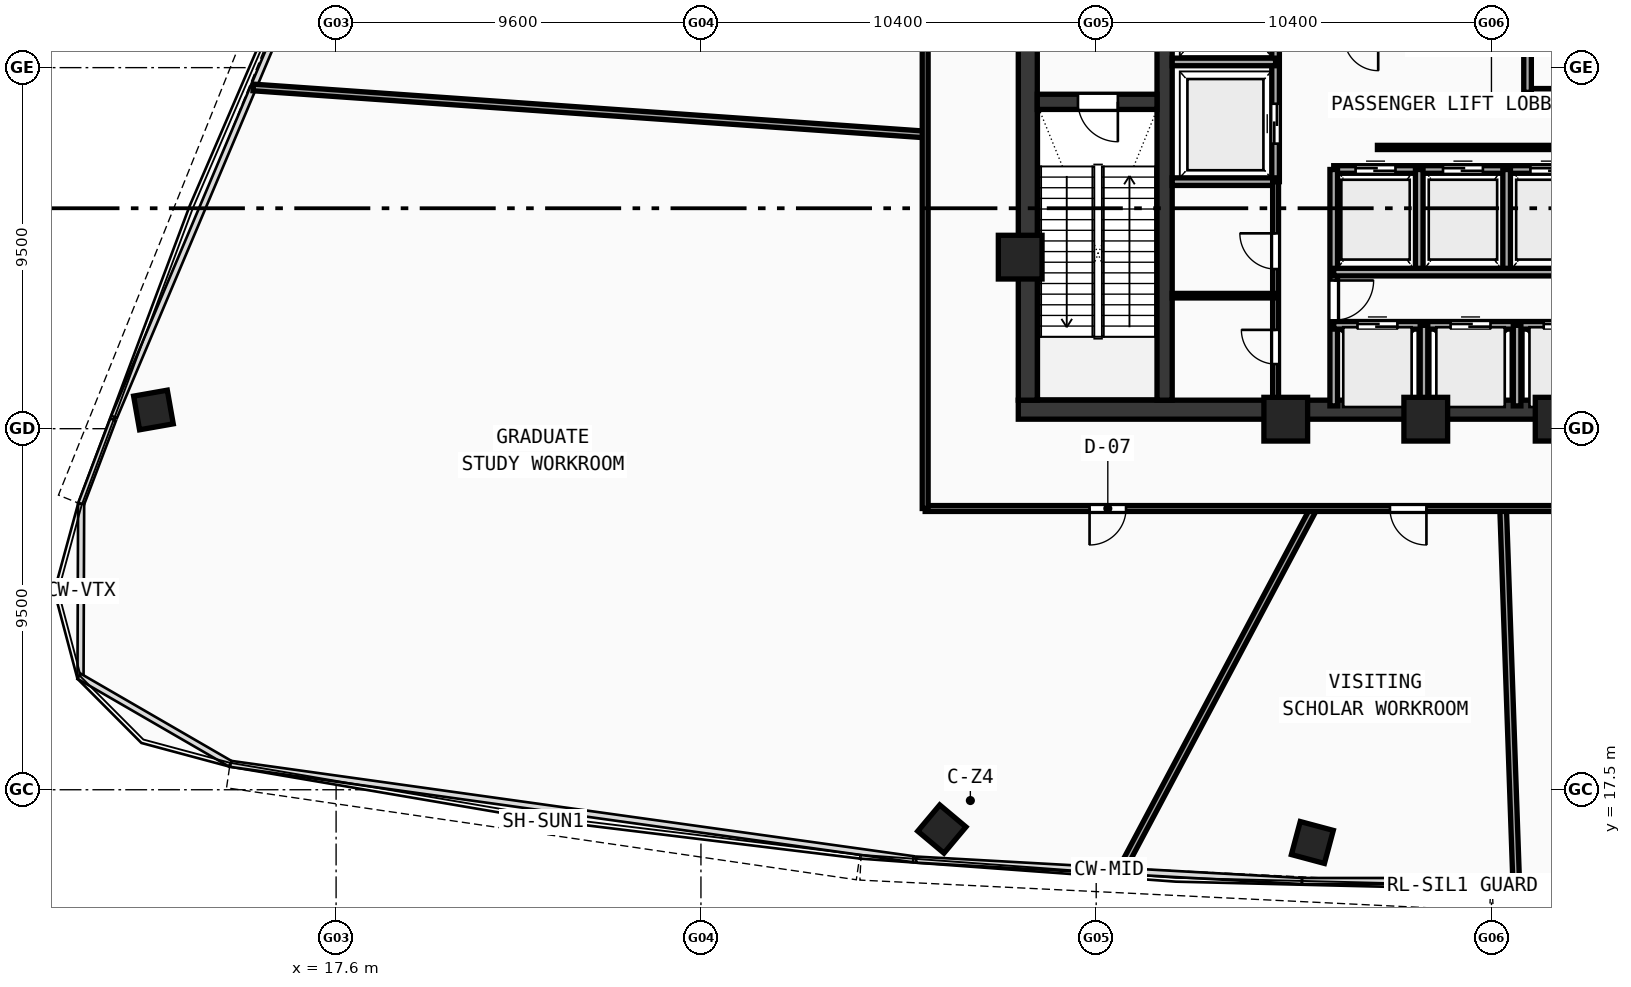
"""IFC4 building model, lengths in metres.
Left out: names, types, materials, properties, quantities, classifications, styles, units other than length and angle.
Written with IfcOpenShell. Run it as: python <this file> out.ifc"""

import sys

from ifc_helpers import new_model, si_unit, direction, frame, frame_2d, origin, origin_with_axes, origin_2d, place, context, subcontext, project, spatial, rectangle, hollow_rectangle, extrude, source, transform, mapped, element, fill, save


model = new_model("IFC4")
c1 = context("Model", 3, precision=1e-05, world=origin(), true_north=direction((0.0, 1.0)))
c2 = subcontext(c1, "Body", "Model", "MODEL_VIEW")
j1 = project(units=[si_unit("LENGTHUNIT", "METRE"), si_unit("PLANEANGLEUNIT", "RADIAN")], contexts=[c1])
p1 = place(None, origin())
s1 = spatial("IfcSite", under=j1, at=p1, CompositionType="ELEMENT")
p2 = place(p1, origin())
s2 = spatial("IfcBuilding", under=s1, at=p2, CompositionType="ELEMENT")
p3 = place(p2, frame((0.0, 0.0, 218.96)))
s3 = spatial("IfcBuildingStorey", under=s2, at=p3, CompositionType="ELEMENT", Elevation=218.96)
p4 = place(p3, frame((35.55, 27.5, 0.0), z_axis=(0.0, 0.0, 1.0), x_axis=(1.0, 0.0, 0.0)))
e1 = element("IfcWall", 1, at=p4, inside=s3, PredefinedType="SHEAR", context=c2, shape_type="SweptSolid", body=[
    extrude(rectangle(XDim=24.9, YDim=0.5, at=frame_2d((12.45, 0.0))), origin(), (0.0, 0.0, 1.0), 5.57),
])
p5 = place(p3, frame((35.8, 27.75, 0.0), z_axis=(0.0, 0.0, 1.0), x_axis=(0.0, 1.0, 0.0)))
e2 = element("IfcWall", 2, at=p5, inside=s3, PredefinedType="SHEAR", context=c2, shape_type="SweptSolid", body=[
    extrude(rectangle(XDim=12.2, YDim=0.5, at=frame_2d((6.1, 0.0))), origin(), (0.0, 0.0, 1.0), 5.57),
])
p6 = place(p3, frame((39.4, 27.75, 0.0), z_axis=(0.0, 0.0, 1.0), x_axis=(0.0, 1.0, 0.0)))
e3 = element("IfcWall", 3, at=p6, inside=s3, PredefinedType="SHEAR", context=c2, shape_type="SweptSolid", body=[
    extrude(rectangle(XDim=12.2, YDim=0.4, at=frame_2d((6.1, 0.0))), origin(), (0.0, 0.0, 1.0), 5.57),
])
p7 = place(p6, frame((10.0, 0.0, 0.0)))
e4 = element("IfcOpeningElement", 4, at=p7, cuts=e3, PredefinedType="OPENING", context=c2, shape_type="SweptSolid", body=[
    extrude(rectangle(XDim=1.1, YDim=2.1, at=frame_2d((0.55, 1.05))), frame((0.0, 0.21, 0.0), z_axis=(0.0, -1.0, 0.0), x_axis=(1.0, 0.0, 0.0)), (0.0, 0.0, 1.0), 0.42),
])
p8 = place(p3, frame((36.05, 35.6, 0.0), z_axis=(0.0, 0.0, 1.0), x_axis=(1.0, 0.0, 0.0)))
e5 = element("IfcWall", 5, at=p8, inside=s3, PredefinedType="SHEAR", context=c2, shape_type="SweptSolid", body=[
    extrude(rectangle(XDim=3.15, YDim=0.4, at=frame_2d((1.575, 0.0))), origin(), (0.0, 0.0, 1.0), 5.57),
])
p9 = place(p8, frame((1.07, 0.0, 0.0)))
e6 = element("IfcOpeningElement", 6, at=p9, cuts=e5, PredefinedType="OPENING", context=c2, shape_type="SweptSolid", body=[
    extrude(rectangle(XDim=1.05, YDim=2.1, at=frame_2d((0.525, 1.05))), frame((0.0, 0.21, 0.0), z_axis=(0.0, -1.0, 0.0), x_axis=(1.0, 0.0, 0.0)), (0.0, 0.0, 1.0), 0.42),
])
m1 = source(origin(), c2, "Body", "SweptSolid", [
    extrude(hollow_rectangle(XDim=1.15, YDim=1.15, WallThickness=0.048, at=origin_2d()), origin(), (0.0, 0.0, 1.0), 5.85),
])
for number, where, z_axis, x_axis in (
    (7, (42.588, 27.25, -0.28), (0.0, 0.0, 1.0), (1.0, 0.0, 0.0)),
    (8, (46.272, 27.25, -0.28), (0.0, 0.0, 1.0), (1.0, 0.0, 0.0)),
    (9, (49.729, 27.25, -0.28), (0.0, 0.0, 1.0), (1.0, 0.0, 0.0)),
    (10, (35.6, 31.513, -0.28), (0.0, 0.0, 1.0), (1.0, 0.0, 0.0)),
):
    element("IfcColumn", number, at=place(p3, frame(where, z_axis=z_axis, x_axis=x_axis)), inside=s3, PredefinedType="COLUMN", context=c2, shape_type="MappedRepresentation", body=[
        mapped(m1, transform((0.0, 0.0, 0.0), scale=1.0)),
    ])
m2 = source(origin(), c2, "Body", "SweptSolid", [
    extrude(hollow_rectangle(XDim=0.9, YDim=0.9, WallThickness=0.036, at=origin_2d()), origin(), (0.0, 0.0, 1.0), 5.85),
])
for number, where, z_axis, x_axis in (
    (11, (33.539, 16.466, -0.28), (0.0, 0.0, 1.0), (0.766, -0.643, 0.0)),
    (12, (43.288, 16.112, -0.28), (0.0, 0.0, 1.0), (0.966, -0.259, 0.0)),
    (13, (12.793, 27.492, -0.28), (0.0, 0.0, 1.0), (0.174, -0.985, 0.0)),
):
    element("IfcColumn", number, at=place(p3, frame(where, z_axis=z_axis, x_axis=x_axis)), inside=s3, PredefinedType="COLUMN", context=c2, shape_type="MappedRepresentation", body=[
        mapped(m2, transform((0.0, 0.0, 0.0), scale=1.0)),
    ])
p10 = place(p3, frame((42.32, 33.5, 0.0), z_axis=(0.0, 0.0, 1.0), x_axis=(0.0, 1.0, 0.0)))
e14 = element("IfcWall", 14, at=p10, inside=s3, PredefinedType="SOLIDWALL", context=c2, shape_type="SweptSolid", body=[
    extrude(rectangle(XDim=6.45, YDim=0.2, at=frame_2d((3.225, 0.0))), origin(), (0.0, 0.0, 1.0), 5.57),
])
p11 = place(p10, frame((1.0, 0.0, 0.0)))
e15 = element("IfcOpeningElement", 15, at=p11, cuts=e14, PredefinedType="OPENING", context=c2, shape_type="SweptSolid", body=[
    extrude(rectangle(XDim=1.05, YDim=2.1, at=frame_2d((0.525, 1.05))), frame((0.0, 0.11, 0.0), z_axis=(0.0, -1.0, 0.0), x_axis=(1.0, 0.0, 0.0)), (0.0, 0.0, 1.0), 0.22),
])
for number, where, z_axis, x_axis in (
    (16, (39.6, 36.65, 0.0), (0.0, 0.0, 1.0), (1.0, 0.0, 0.0)),
    (17, (39.6, 33.5, 0.0), (0.0, 0.0, 1.0), (1.0, 0.0, 0.0)),
):
    element("IfcWall", number, at=place(p3, frame(where, z_axis=z_axis, x_axis=x_axis)), inside=s3, PredefinedType="SOLIDWALL", context=c2, shape_type="SweptSolid", body=[
        extrude(rectangle(XDim=2.72, YDim=0.2, at=frame_2d((1.36, 0.0))), origin(), (0.0, 0.0, 1.0), 5.57),
    ])
p12 = place(p3, frame((48.95, 35.85, 0.0), z_axis=(0.0, 0.0, 1.0), x_axis=(1.0, 0.0, 0.0)))
e18 = element("IfcWall", 18, at=p12, inside=s3, PredefinedType="SOLIDWALL", context=c2, shape_type="SweptSolid", body=[
    extrude(rectangle(XDim=4.73, YDim=0.2, at=frame_2d((2.365, 0.0))), origin(), (0.0, 0.0, 1.0), 5.57),
])
p13 = place(p12, frame((1.8, 0.0, 0.0)))
e19 = element("IfcOpeningElement", 19, at=p13, cuts=e18, PredefinedType="OPENING", context=c2, shape_type="SweptSolid", body=[
    extrude(rectangle(XDim=0.9, YDim=2.1, at=frame_2d((0.45, 1.05))), frame((0.0, 0.11, 0.0), z_axis=(0.0, -1.0, 0.0), x_axis=(1.0, 0.0, 0.0)), (0.0, 0.0, 1.0), 0.22),
])
p14 = place(p3, frame((48.95, 35.85, 0.0), z_axis=(0.0, 0.0, 1.0), x_axis=(0.0, 1.0, 0.0)))
e20 = element("IfcWall", 20, at=p14, inside=s3, PredefinedType="SOLIDWALL", context=c2, shape_type="SweptSolid", body=[
    extrude(rectangle(XDim=4.1, YDim=0.2, at=frame_2d((2.05, 0.0))), origin(), (0.0, 0.0, 1.0), 5.57),
])
p15 = place(p3, frame((43.85, 33.82, 0.0), z_axis=(0.0, 0.0, 1.0), x_axis=(1.0, 0.0, 0.0)))
e21 = element("IfcWall", 21, at=p15, inside=s3, PredefinedType="SOLIDWALL", context=c2, shape_type="SweptSolid", body=[
    extrude(rectangle(XDim=9.83, YDim=0.2, at=frame_2d((4.915, 0.0))), origin(), (0.0, 0.0, 1.0), 5.57),
])
p16 = place(p15, frame((0.575, 0.0, 0.0)))
e22 = element("IfcOpeningElement", 22, at=p16, cuts=e21, PredefinedType="OPENING", context=c2, shape_type="SweptSolid", body=[
    extrude(rectangle(XDim=1.05, YDim=2.1, at=frame_2d((0.525, 1.05))), frame((0.0, 0.11, 0.0), z_axis=(0.0, -1.0, 0.0), x_axis=(1.0, 0.0, 0.0)), (0.0, 0.0, 1.0), 0.22),
])
p17 = place(p15, frame((2.875, 0.0, 0.0)))
e23 = element("IfcOpeningElement", 23, at=p17, cuts=e21, PredefinedType="OPENING", context=c2, shape_type="SweptSolid", body=[
    extrude(rectangle(XDim=1.05, YDim=2.1, at=frame_2d((0.525, 1.05))), frame((0.0, 0.11, 0.0), z_axis=(0.0, -1.0, 0.0), x_axis=(1.0, 0.0, 0.0)), (0.0, 0.0, 1.0), 0.22),
])
p18 = place(p15, frame((5.175, 0.0, 0.0)))
e24 = element("IfcOpeningElement", 24, at=p18, cuts=e21, PredefinedType="OPENING", context=c2, shape_type="SweptSolid", body=[
    extrude(rectangle(XDim=1.05, YDim=2.1, at=frame_2d((0.525, 1.05))), frame((0.0, 0.11, 0.0), z_axis=(0.0, -1.0, 0.0), x_axis=(1.0, 0.0, 0.0)), (0.0, 0.0, 1.0), 0.22),
])
p19 = place(p15, frame((7.475, 0.0, 0.0)))
e25 = element("IfcOpeningElement", 25, at=p19, cuts=e21, PredefinedType="OPENING", context=c2, shape_type="SweptSolid", body=[
    extrude(rectangle(XDim=1.05, YDim=2.1, at=frame_2d((0.525, 1.05))), frame((0.0, 0.11, 0.0), z_axis=(0.0, -1.0, 0.0), x_axis=(1.0, 0.0, 0.0)), (0.0, 0.0, 1.0), 0.22),
])
p20 = place(p3, frame((43.85, 27.6, 0.0), z_axis=(0.0, 0.0, 1.0), x_axis=(0.0, 1.0, 0.0)))
e26 = element("IfcWall", 26, at=p20, inside=s3, PredefinedType="SOLIDWALL", context=c2, shape_type="SweptSolid", body=[
    extrude(rectangle(XDim=6.22, YDim=0.2, at=frame_2d((3.11, 0.0))), origin(), (0.0, 0.0, 1.0), 5.57),
])
p21 = place(p20, frame((2.25, 0.0, 0.0)))
e27 = element("IfcOpeningElement", 27, at=p21, cuts=e26, PredefinedType="OPENING", context=c2, shape_type="SweptSolid", body=[
    extrude(rectangle(XDim=1.05, YDim=2.1, at=frame_2d((0.525, 1.05))), frame((0.0, 0.11, 0.0), z_axis=(0.0, -1.0, 0.0), x_axis=(1.0, 0.0, 0.0)), (0.0, 0.0, 1.0), 0.22),
])
for number, where, z_axis, x_axis in (
    (28, (46.1, 31.12, 0.0), (0.0, 0.0, 1.0), (0.0, 1.0, 0.0)),
    (29, (48.4, 31.12, 0.0), (0.0, 0.0, 1.0), (0.0, 1.0, 0.0)),
):
    element("IfcWall", number, at=place(p3, frame(where, z_axis=z_axis, x_axis=x_axis)), inside=s3, PredefinedType="SOLIDWALL", context=c2, shape_type="SweptSolid", body=[
        extrude(rectangle(XDim=2.7, YDim=0.2, at=frame_2d((1.35, 0.0))), origin(), (0.0, 0.0, 1.0), 5.57),
    ])
p22 = place(p3, frame((43.85, 29.72, 0.0), z_axis=(0.0, 0.0, 1.0), x_axis=(1.0, 0.0, 0.0)))
e30 = element("IfcWall", 30, at=p22, inside=s3, PredefinedType="SOLIDWALL", context=c2, shape_type="SweptSolid", body=[
    extrude(rectangle(XDim=7.2, YDim=0.2, at=frame_2d((3.6, 0.0))), origin(), (0.0, 0.0, 1.0), 5.57),
])
p23 = place(p22, frame((0.625, 0.0, 0.0)))
e31 = element("IfcOpeningElement", 31, at=p23, cuts=e30, PredefinedType="OPENING", context=c2, shape_type="SweptSolid", body=[
    extrude(rectangle(XDim=1.05, YDim=2.1, at=frame_2d((0.525, 1.05))), frame((0.0, 0.11, 0.0), z_axis=(0.0, -1.0, 0.0), x_axis=(1.0, 0.0, 0.0)), (0.0, 0.0, 1.0), 0.22),
])
p24 = place(p22, frame((3.075, 0.0, 0.0)))
e32 = element("IfcOpeningElement", 32, at=p24, cuts=e30, PredefinedType="OPENING", context=c2, shape_type="SweptSolid", body=[
    extrude(rectangle(XDim=1.05, YDim=2.1, at=frame_2d((0.525, 1.05))), frame((0.0, 0.11, 0.0), z_axis=(0.0, -1.0, 0.0), x_axis=(1.0, 0.0, 0.0)), (0.0, 0.0, 1.0), 0.22),
])
p25 = place(p22, frame((5.525, 0.0, 0.0)))
e33 = element("IfcOpeningElement", 33, at=p25, cuts=e30, PredefinedType="OPENING", context=c2, shape_type="SweptSolid", body=[
    extrude(rectangle(XDim=1.05, YDim=2.1, at=frame_2d((0.525, 1.05))), frame((0.0, 0.11, 0.0), z_axis=(0.0, -1.0, 0.0), x_axis=(1.0, 0.0, 0.0)), (0.0, 0.0, 1.0), 0.22),
])
p26 = place(p3, frame((43.85, 31.12, 0.0), z_axis=(0.0, 0.0, 1.0), x_axis=(1.0, 0.0, 0.0)))
e34 = element("IfcWall", 34, at=p26, inside=s3, PredefinedType="SOLIDWALL", context=c2, shape_type="SweptSolid", body=[
    extrude(rectangle(XDim=9.83, YDim=0.2, at=frame_2d((4.915, 0.0))), origin(), (0.0, 0.0, 1.0), 5.57),
])
p27 = place(p3, frame((46.225, 27.6, 0.0), z_axis=(0.0, 0.0, 1.0), x_axis=(0.0, 1.0, 0.0)))
e35 = element("IfcWall", 35, at=p27, inside=s3, PredefinedType="SOLIDWALL", context=c2, shape_type="SweptSolid", body=[
    extrude(rectangle(XDim=2.12, YDim=0.2, at=frame_2d((1.06, 0.0))), origin(), (0.0, 0.0, 1.0), 2.22),
])
p28 = place(p3, frame((48.675, 27.6, 0.0), z_axis=(0.0, 0.0, 1.0), x_axis=(0.0, 1.0, 0.0)))
e36 = element("IfcWall", 36, at=p28, inside=s3, PredefinedType="SOLIDWALL", context=c2, shape_type="SweptSolid", body=[
    extrude(rectangle(XDim=2.12, YDim=0.2, at=frame_2d((1.06, 0.0))), origin(), (0.0, 0.0, 1.0), 5.57),
])
p29 = place(p3, frame((42.32, 27.6, 0.0), z_axis=(0.0, 0.0, 1.0), x_axis=(0.0, 1.0, 0.0)))
e37 = element("IfcWall", 37, at=p29, inside=s3, PredefinedType="PARTITIONING", context=c2, shape_type="SweptSolid", body=[
    extrude(rectangle(XDim=5.9, YDim=0.155, at=frame_2d((2.95, 0.0))), origin(), (0.0, 0.0, 1.0), 2.22),
])
p30 = place(p29, frame((1.1, 0.0, 0.0)))
e38 = element("IfcOpeningElement", 38, at=p30, cuts=e37, PredefinedType="OPENING", context=c2, shape_type="SweptSolid", body=[
    extrude(rectangle(XDim=0.9, YDim=2.1, at=frame_2d((0.45, 1.05))), frame((0.0, 0.087, 0.0), z_axis=(0.0, -1.0, 0.0), x_axis=(1.0, 0.0, 0.0)), (0.0, 0.0, 1.0), 0.175),
])
p31 = place(p29, frame((3.6, 0.0, 0.0)))
e39 = element("IfcOpeningElement", 39, at=p31, cuts=e37, PredefinedType="OPENING", context=c2, shape_type="SweptSolid", body=[
    extrude(rectangle(XDim=0.94, YDim=2.1, at=frame_2d((0.47, 1.05))), frame((0.0, 0.087, 0.0), z_axis=(0.0, -1.0, 0.0), x_axis=(1.0, 0.0, 0.0)), (0.0, 0.0, 1.0), 0.175),
])
p32 = place(p3, frame((39.6, 30.5, 0.0), z_axis=(0.0, 0.0, 1.0), x_axis=(1.0, 0.0, 0.0)))
e40 = element("IfcWall", 40, at=p32, inside=s3, PredefinedType="PARTITIONING", context=c2, shape_type="SweptSolid", body=[
    extrude(rectangle(XDim=2.72, YDim=0.12, at=frame_2d((1.36, 0.0))), origin(), (0.0, 0.0, 1.0), 5.57),
])
p33 = place(p3, frame((33.1, 34.742, 0.0), z_axis=(0.0, 0.0, 1.0), x_axis=(-0.997564635211, 0.069748108048, 0.0)))
e41 = element("IfcWall", 41, at=p33, inside=s3, PredefinedType="PARTITIONING", context=c2, shape_type="SweptSolid", body=[
    extrude(rectangle(XDim=17.722, YDim=0.175, at=frame_2d((8.861, 0.0))), origin(), (0.0, 0.0, 1.0), 4.92),
])
p34 = place(p3, frame((43.321, 24.9, 0.0), z_axis=(0.0, 0.0, 1.0), x_axis=(-0.469485148904, -0.882940368858, 0.0)))
e42 = element("IfcWall", 42, at=p34, inside=s3, PredefinedType="PARTITIONING", context=c2, shape_type="SweptSolid", body=[
    extrude(rectangle(XDim=10.802, YDim=0.175, at=frame_2d((5.401, 0.0))), origin(), (0.0, 0.0, 1.0), 4.92),
])
p35 = place(p3, frame((48.307, 24.9, 0.0), z_axis=(0.0, 0.0, 1.0), x_axis=(0.034898652042, -0.999390856515, 0.0)))
e43 = element("IfcWall", 43, at=p35, inside=s3, PredefinedType="PARTITIONING", context=c2, shape_type="SweptSolid", body=[
    extrude(rectangle(XDim=9.808, YDim=0.175, at=frame_2d((4.904, 0.0))), origin(), (0.0, 0.0, 1.0), 4.92),
])
p36 = place(p3, frame((62.9, 24.9, 0.0), z_axis=(0.0, 0.0, 1.0), x_axis=(-1.0, 0.0, 0.0)))
e44 = element("IfcWall", 44, at=p36, inside=s3, PredefinedType="PARTITIONING", context=c2, shape_type="SweptSolid", body=[
    extrude(rectangle(XDim=29.8, YDim=0.155, at=frame_2d((14.9, 0.0))), origin(), (0.0, 0.0, 1.0), 2.22),
])
p37 = place(p36, frame((24.514, 0.0, 0.0)))
e45 = element("IfcOpeningElement", 45, at=p37, cuts=e44, PredefinedType="OPENING", context=c2, shape_type="SweptSolid", body=[
    extrude(rectangle(XDim=0.96, YDim=2.12, at=frame_2d((0.48, 1.06))), frame((0.0, 0.087, 0.0), z_axis=(0.0, -1.0, 0.0), x_axis=(1.0, 0.0, 0.0)), (0.0, 0.0, 1.0), 0.175),
])
p38 = place(p36, frame((16.611, 0.0, 0.0)))
e46 = element("IfcOpeningElement", 46, at=p38, cuts=e44, PredefinedType="OPENING", context=c2, shape_type="SweptSolid", body=[
    extrude(rectangle(XDim=0.96, YDim=2.12, at=frame_2d((0.48, 1.06))), frame((0.0, 0.087, 0.0), z_axis=(0.0, -1.0, 0.0), x_axis=(1.0, 0.0, 0.0)), (0.0, 0.0, 1.0), 0.175),
])
p39 = place(p36, frame((8.215, 0.0, 0.0)))
e47 = element("IfcOpeningElement", 47, at=p39, cuts=e44, PredefinedType="OPENING", context=c2, shape_type="SweptSolid", body=[
    extrude(rectangle(XDim=0.96, YDim=2.12, at=frame_2d((0.48, 1.06))), frame((0.0, 0.087, 0.0), z_axis=(0.0, -1.0, 0.0), x_axis=(1.0, 0.0, 0.0)), (0.0, 0.0, 1.0), 0.175),
])
p40 = place(p3, frame((33.1, 24.9, 0.0), z_axis=(0.0, 0.0, 1.0), x_axis=(0.0, 1.0, 0.0)))
e48 = element("IfcWall", 48, at=p40, inside=s3, PredefinedType="PARTITIONING", context=c2, shape_type="SweptSolid", body=[
    extrude(rectangle(XDim=18.0, YDim=0.155, at=frame_2d((9.0, 0.0))), origin(), (0.0, 0.0, 1.0), 2.22),
])
p41 = place(p40, frame((13.746, 0.0, 0.0)))
e49 = element("IfcOpeningElement", 49, at=p41, cuts=e48, PredefinedType="OPENING", context=c2, shape_type="SweptSolid", body=[
    extrude(rectangle(XDim=0.96, YDim=2.12, at=frame_2d((0.48, 1.06))), frame((0.0, 0.087, 0.0), z_axis=(0.0, -1.0, 0.0), x_axis=(1.0, 0.0, 0.0)), (0.0, 0.0, 1.0), 0.175),
])
p42 = place(p3, frame((45.0, 34.4, 0.0), z_axis=(0.0, 0.0, 1.0), x_axis=(1.0, 0.0, 0.0)))
e50 = element("IfcWall", 50, at=p42, inside=s3, PredefinedType="MOVABLE", context=c2, shape_type="SweptSolid", body=[
    extrude(rectangle(XDim=6.0, YDim=0.11, at=frame_2d((3.0, 0.0))), origin(), (0.0, 0.0, 1.0), 2.5),
])
m3 = source(origin(), c2, "Body", "SweptSolid", [
    extrude(rectangle(XDim=1.05, YDim=2.1, at=frame_2d((0.525, 1.05))), frame((0.0, 0.025, 0.0), z_axis=(0.0, -1.0, 0.0), x_axis=(1.0, 0.0, 0.0)), (0.0, 0.0, 1.0), 0.05),
])
p43 = place(p9, frame((1.05, 0.0, 0.0), z_axis=(0.0, 0.0, 1.0), x_axis=(-1.0, 0.0, 0.0)))
e51 = element("IfcDoor", 51, at=p43, inside=s3, OperationType="SINGLE_SWING_LEFT", PredefinedType="DOOR", context=c2, shape_type="MappedRepresentation", body=[
    mapped(m3, transform((0.0, 0.0, 0.0), scale=1.0)),
])
fill(e6, e51)
p44 = place(p11, origin_with_axes())
e52 = element("IfcDoor", 52, at=p44, inside=s3, OperationType="DOUBLE_DOOR_SLIDING", PredefinedType="DOOR", context=c2, shape_type="MappedRepresentation", body=[
    mapped(m3, transform((0.0, 0.0, 0.0), scale=1.0)),
])
fill(e15, e52)
p45 = place(p16, origin_with_axes())
e53 = element("IfcDoor", 53, at=p45, inside=s3, OperationType="DOUBLE_DOOR_SLIDING", PredefinedType="DOOR", context=c2, shape_type="MappedRepresentation", body=[
    mapped(m3, transform((0.0, 0.0, 0.0), scale=1.0)),
])
fill(e22, e53)
p46 = place(p17, origin_with_axes())
e54 = element("IfcDoor", 54, at=p46, inside=s3, OperationType="DOUBLE_DOOR_SLIDING", PredefinedType="DOOR", context=c2, shape_type="MappedRepresentation", body=[
    mapped(m3, transform((0.0, 0.0, 0.0), scale=1.0)),
])
fill(e23, e54)
p47 = place(p18, origin_with_axes())
e55 = element("IfcDoor", 55, at=p47, inside=s3, OperationType="DOUBLE_DOOR_SLIDING", PredefinedType="DOOR", context=c2, shape_type="MappedRepresentation", body=[
    mapped(m3, transform((0.0, 0.0, 0.0), scale=1.0)),
])
fill(e24, e55)
p48 = place(p21, frame((1.05, 0.0, 0.0), z_axis=(0.0, 0.0, 1.0), x_axis=(-1.0, 0.0, 0.0)))
e56 = element("IfcDoor", 56, at=p48, inside=s3, OperationType="SINGLE_SWING_LEFT", PredefinedType="DOOR", context=c2, shape_type="MappedRepresentation", body=[
    mapped(m3, transform((0.0, 0.0, 0.0), scale=1.0)),
])
fill(e27, e56)
p49 = place(p23, origin_with_axes())
e57 = element("IfcDoor", 57, at=p49, inside=s3, OperationType="DOUBLE_DOOR_SLIDING", PredefinedType="DOOR", context=c2, shape_type="MappedRepresentation", body=[
    mapped(m3, transform((0.0, 0.0, 0.0), scale=1.0)),
])
fill(e31, e57)
p50 = place(p24, origin_with_axes())
e58 = element("IfcDoor", 58, at=p50, inside=s3, OperationType="DOUBLE_DOOR_SLIDING", PredefinedType="DOOR", context=c2, shape_type="MappedRepresentation", body=[
    mapped(m3, transform((0.0, 0.0, 0.0), scale=1.0)),
])
fill(e32, e58)
p51 = place(p25, origin_with_axes())
e59 = element("IfcDoor", 59, at=p51, inside=s3, OperationType="DOUBLE_DOOR_SLIDING", PredefinedType="DOOR", context=c2, shape_type="MappedRepresentation", body=[
    mapped(m3, transform((0.0, 0.0, 0.0), scale=1.0)),
])
fill(e33, e59)
m4 = source(origin(), c2, "Body", "SweptSolid", [
    extrude(rectangle(XDim=0.9, YDim=2.1, at=frame_2d((0.45, 1.05))), frame((0.0, 0.025, 0.0), z_axis=(0.0, -1.0, 0.0), x_axis=(1.0, 0.0, 0.0)), (0.0, 0.0, 1.0), 0.05),
])
p52 = place(p30, origin_with_axes())
e60 = element("IfcDoor", 60, at=p52, inside=s3, OperationType="SINGLE_SWING_RIGHT", PredefinedType="DOOR", context=c2, shape_type="MappedRepresentation", body=[
    mapped(m4, transform((0.0, 0.0, 0.0), scale=1.0)),
])
fill(e38, e60)
m5 = source(origin(), c2, "Body", "SweptSolid", [
    extrude(rectangle(XDim=0.94, YDim=2.1, at=frame_2d((0.47, 1.05))), frame((0.0, 0.025, 0.0), z_axis=(0.0, -1.0, 0.0), x_axis=(1.0, 0.0, 0.0)), (0.0, 0.0, 1.0), 0.05),
])
p53 = place(p31, origin_with_axes())
e61 = element("IfcDoor", 61, at=p53, inside=s3, OperationType="SINGLE_SWING_RIGHT", PredefinedType="DOOR", context=c2, shape_type="MappedRepresentation", body=[
    mapped(m5, transform((0.0, 0.0, 0.0), scale=1.0)),
])
fill(e39, e61)
m6 = source(origin(), c2, "Body", "SweptSolid", [
    extrude(rectangle(XDim=0.96, YDim=2.12, at=frame_2d((0.48, 1.06))), frame((0.0, 0.025, 0.0), z_axis=(0.0, -1.0, 0.0), x_axis=(1.0, 0.0, 0.0)), (0.0, 0.0, 1.0), 0.05),
])
p54 = place(p37, origin_with_axes())
e62 = element("IfcDoor", 62, at=p54, inside=s3, OperationType="SINGLE_SWING_RIGHT", PredefinedType="DOOR", context=c2, shape_type="MappedRepresentation", body=[
    mapped(m6, transform((0.0, 0.0, 0.0), scale=1.0)),
])
fill(e45, e62)
p55 = place(p38, origin_with_axes())
e63 = element("IfcDoor", 63, at=p55, inside=s3, OperationType="SINGLE_SWING_LEFT", PredefinedType="DOOR", context=c2, shape_type="MappedRepresentation", body=[
    mapped(m6, transform((0.0, 0.0, 0.0), scale=1.0)),
])
fill(e46, e63)
save(model, sys.argv[1])
